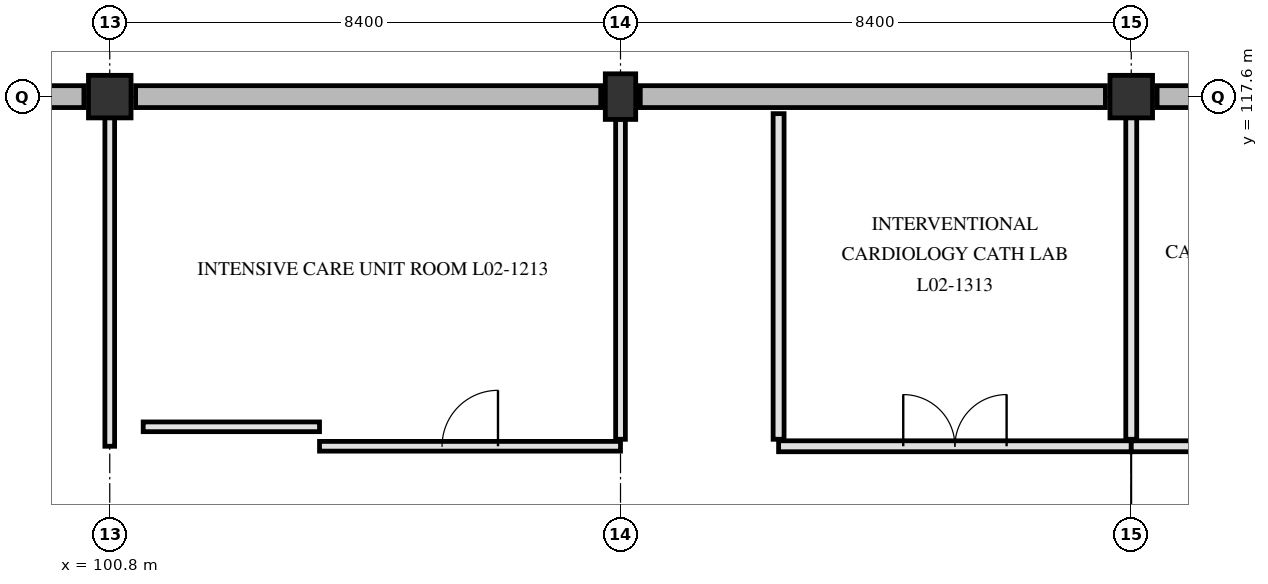
"""IFC4 building model, lengths in metres.
Left out: names, types, materials, properties, quantities, classifications, styles, units other than length and angle.
Written with IfcOpenShell. Run it as: python <this file> out.ifc"""

import sys

from ifc_helpers import new_model, si_unit, direction, frame, frame_2d, origin, origin_2d, place, context, subcontext, project, spatial, rectangle, extrude, element, fill, save


model = new_model("IFC4")
c1 = context("Model", 3, precision=1e-05, world=origin(), true_north=direction((0.0, 1.0)))
c2 = subcontext(c1, "Body", "Model", "MODEL_VIEW")
j1 = project(units=[si_unit("LENGTHUNIT", "METRE"), si_unit("PLANEANGLEUNIT", "RADIAN")], contexts=[c1])
p1 = place(None, origin())
s1 = spatial("IfcSite", under=j1, at=p1, CompositionType="ELEMENT")
p2 = place(p1, origin())
s2 = spatial("IfcBuilding", under=s1, at=p2, CompositionType="ELEMENT")
p3 = place(p2, frame((0.0, 0.0, 9.3)))
s3 = spatial("IfcBuildingStorey", under=s2, at=p3, CompositionType="ELEMENT", Elevation=9.3)
p4 = place(p3, frame((100.8, 117.6, 0.0), z_axis=(0.0, 0.0, 1.0), x_axis=(1.0, 0.0, 0.0)))
e1 = element("IfcColumn", 1, at=p4, inside=s3, PredefinedType="COLUMN", context=c2, shape_type="SweptSolid", body=[
    extrude(rectangle(XDim=0.7, YDim=0.7, at=origin_2d()), origin(), (0.0, 0.0, 1.0), 5.1),
])
p5 = place(p3, frame((109.2, 117.6, 0.0), z_axis=(0.0, 0.0, 1.0), x_axis=(1.0, 0.0, 0.0)))
e2 = element("IfcColumn", 2, at=p5, inside=s3, PredefinedType="PILASTER", context=c2, shape_type="SweptSolid", body=[
    extrude(rectangle(XDim=0.5, YDim=0.75, at=origin_2d()), origin(), (0.0, 0.0, 1.0), 5.1),
])
p6 = place(p3, frame((117.6, 117.6, 0.0), z_axis=(0.0, 0.0, 1.0), x_axis=(1.0, 0.0, 0.0)))
e3 = element("IfcColumn", 3, at=p6, inside=s3, PredefinedType="COLUMN", context=c2, shape_type="SweptSolid", body=[
    extrude(rectangle(XDim=0.7, YDim=0.7, at=origin_2d()), origin(), (0.0, 0.0, 1.0), 5.1),
])
p7 = place(p3, frame((92.825, 117.6, 0.0), z_axis=(0.0, 0.0, 1.0), x_axis=(1.0, 0.0, 0.0)))
e4 = element("IfcWall", 4, at=p7, inside=s3, PredefinedType="SOLIDWALL", context=c2, shape_type="SweptSolid", body=[
    extrude(rectangle(XDim=7.55, YDim=0.36, at=frame_2d((3.775, 0.0))), origin(), (0.0, 0.0, 1.0), 4.78),
])
p8 = place(p3, frame((101.225, 117.6, 0.0), z_axis=(0.0, 0.0, 1.0), x_axis=(1.0, 0.0, 0.0)))
e5 = element("IfcWall", 5, at=p8, inside=s3, PredefinedType="SOLIDWALL", context=c2, shape_type="SweptSolid", body=[
    extrude(rectangle(XDim=7.65, YDim=0.36, at=frame_2d((3.825, 0.0))), origin(), (0.0, 0.0, 1.0), 4.78),
])
p9 = place(p3, frame((109.525, 117.6, 0.0), z_axis=(0.0, 0.0, 1.0), x_axis=(1.0, 0.0, 0.0)))
e6 = element("IfcWall", 6, at=p9, inside=s3, PredefinedType="SOLIDWALL", context=c2, shape_type="SweptSolid", body=[
    extrude(rectangle(XDim=7.65, YDim=0.36, at=frame_2d((3.825, 0.0))), origin(), (0.0, 0.0, 1.0), 4.78),
])
p10 = place(p3, frame((118.025, 117.6, 0.0), z_axis=(0.0, 0.0, 1.0), x_axis=(1.0, 0.0, 0.0)))
e7 = element("IfcWall", 7, at=p10, inside=s3, PredefinedType="SOLIDWALL", context=c2, shape_type="SweptSolid", body=[
    extrude(rectangle(XDim=7.55, YDim=0.36, at=frame_2d((3.775, 0.0))), origin(), (0.0, 0.0, 1.0), 4.78),
])
p11 = place(p3, frame((104.25, 111.85, 0.0), z_axis=(0.0, 0.0, 1.0), x_axis=(1.0, 0.0, 0.0)))
e8 = element("IfcWall", 8, at=p11, inside=s3, PredefinedType="PARTITIONING", context=c2, shape_type="SweptSolid", body=[
    extrude(rectangle(XDim=4.95, YDim=0.16, at=frame_2d((2.475, 0.0))), origin(), (0.0, 0.0, 1.0), 4.17),
])
p12 = place(p11, frame((2.015, 0.0, 0.0)))
e9 = element("IfcOpeningElement", 9, at=p12, cuts=e8, PredefinedType="OPENING", context=c2, shape_type="SweptSolid", body=[
    extrude(rectangle(XDim=0.92, YDim=2.08, at=frame_2d((0.46, 1.04))), frame((0.0, 0.09, 0.0), z_axis=(0.0, -1.0, 0.0), x_axis=(1.0, 0.0, 0.0)), (0.0, 0.0, 1.0), 0.18),
])
p13 = place(p3, frame((111.8, 111.85, 0.0), z_axis=(0.0, 0.0, 1.0), x_axis=(1.0, 0.0, 0.0)))
e10 = element("IfcWall", 10, at=p13, inside=s3, PredefinedType="PARTITIONING", context=c2, shape_type="SweptSolid", body=[
    extrude(rectangle(XDim=5.8, YDim=0.18, at=frame_2d((2.9, 0.0))), origin(), (0.0, 0.0, 1.0), 4.17),
])
p14 = place(p13, frame((2.05, 0.0, 0.0)))
e11 = element("IfcOpeningElement", 11, at=p14, cuts=e10, PredefinedType="OPENING", context=c2, shape_type="SweptSolid", body=[
    extrude(rectangle(XDim=1.7, YDim=2.25, at=frame_2d((0.85, 1.125))), frame((0.0, 0.1, 0.0), z_axis=(0.0, -1.0, 0.0), x_axis=(1.0, 0.0, 0.0)), (0.0, 0.0, 1.0), 0.2),
])
p15 = place(p3, frame((117.6, 111.85, 0.0), z_axis=(0.0, 0.0, 1.0), x_axis=(1.0, 0.0, 0.0)))
e12 = element("IfcWall", 12, at=p15, inside=s3, PredefinedType="PARTITIONING", context=c2, shape_type="SweptSolid", body=[
    extrude(rectangle(XDim=8.4, YDim=0.18, at=frame_2d((4.2, 0.0))), origin(), (0.0, 0.0, 1.0), 4.17),
])
p16 = place(p15, frame((3.28, 0.0, 0.0)))
e13 = element("IfcOpeningElement", 13, at=p16, cuts=e12, PredefinedType="OPENING", context=c2, shape_type="SweptSolid", body=[
    extrude(rectangle(XDim=1.84, YDim=2.28, at=frame_2d((0.92, 1.14))), frame((0.0, 0.1, 0.0), z_axis=(0.0, -1.0, 0.0), x_axis=(1.0, 0.0, 0.0)), (0.0, 0.0, 1.0), 0.2),
])
p17 = place(p3, frame((101.35, 112.17, 0.0), z_axis=(0.0, 0.0, 1.0), x_axis=(1.0, 0.0, 0.0)))
e14 = element("IfcWall", 14, at=p17, inside=s3, PredefinedType="PARTITIONING", context=c2, shape_type="SweptSolid", body=[
    extrude(rectangle(XDim=2.9, YDim=0.16, at=frame_2d((1.45, 0.0))), origin(), (0.0, 0.0, 1.0), 4.77),
])
p18 = place(p3, frame((100.8, 111.85, 0.0), z_axis=(0.0, 0.0, 1.0), x_axis=(0.0, 1.0, 0.0)))
e15 = element("IfcWall", 15, at=p18, inside=s3, PredefinedType="PARTITIONING", context=c2, shape_type="SweptSolid", body=[
    extrude(rectangle(XDim=5.405, YDim=0.16, at=frame_2d((2.702, 0.0))), origin(), (0.0, 0.0, 1.0), 4.17),
])
p19 = place(p3, frame((109.2, 111.965, 0.0), z_axis=(0.0, 0.0, 1.0), x_axis=(0.0, 1.0, 0.0)))
e16 = element("IfcWall", 16, at=p19, inside=s3, PredefinedType="PARTITIONING", context=c2, shape_type="SweptSolid", body=[
    extrude(rectangle(XDim=5.265, YDim=0.16, at=frame_2d((2.632, 0.0))), origin(), (0.0, 0.0, 1.0), 4.17),
])
p20 = place(p3, frame((111.8, 111.965, 0.0), z_axis=(0.0, 0.0, 1.0), x_axis=(0.0, 1.0, 0.0)))
e17 = element("IfcWall", 17, at=p20, inside=s3, PredefinedType="PARTITIONING", context=c2, shape_type="SweptSolid", body=[
    extrude(rectangle(XDim=5.355, YDim=0.18, at=frame_2d((2.677, 0.0))), origin(), (0.0, 0.0, 1.0), 4.77),
])
p21 = place(p3, frame((117.6, 111.965, 0.0), z_axis=(0.0, 0.0, 1.0), x_axis=(0.0, 1.0, 0.0)))
e18 = element("IfcWall", 18, at=p21, inside=s3, PredefinedType="PARTITIONING", context=c2, shape_type="SweptSolid", body=[
    extrude(rectangle(XDim=5.29, YDim=0.18, at=frame_2d((2.645, 0.0))), origin(), (0.0, 0.0, 1.0), 4.17),
])
p22 = place(p12, origin())
e19 = element("IfcDoor", 19, at=p22, inside=s3, OperationType="SINGLE_SWING_RIGHT", PredefinedType="DOOR", context=c2, shape_type="SweptSolid", body=[
    extrude(rectangle(XDim=0.92, YDim=2.08, at=frame_2d((0.46, 1.04))), frame((0.0, 0.025, 0.0), z_axis=(0.0, -1.0, 0.0), x_axis=(1.0, 0.0, 0.0)), (0.0, 0.0, 1.0), 0.05),
])
fill(e9, e19)
p23 = place(p14, origin())
e20 = element("IfcDoor", 20, at=p23, inside=s3, OperationType="DOUBLE_SWING_RIGHT", PredefinedType="DOOR", context=c2, shape_type="SweptSolid", body=[
    extrude(rectangle(XDim=1.7, YDim=2.25, at=frame_2d((0.85, 1.125))), frame((0.0, 0.025, 0.0), z_axis=(0.0, -1.0, 0.0), x_axis=(1.0, 0.0, 0.0)), (0.0, 0.0, 1.0), 0.05),
])
fill(e11, e20)
save(model, sys.argv[1])
